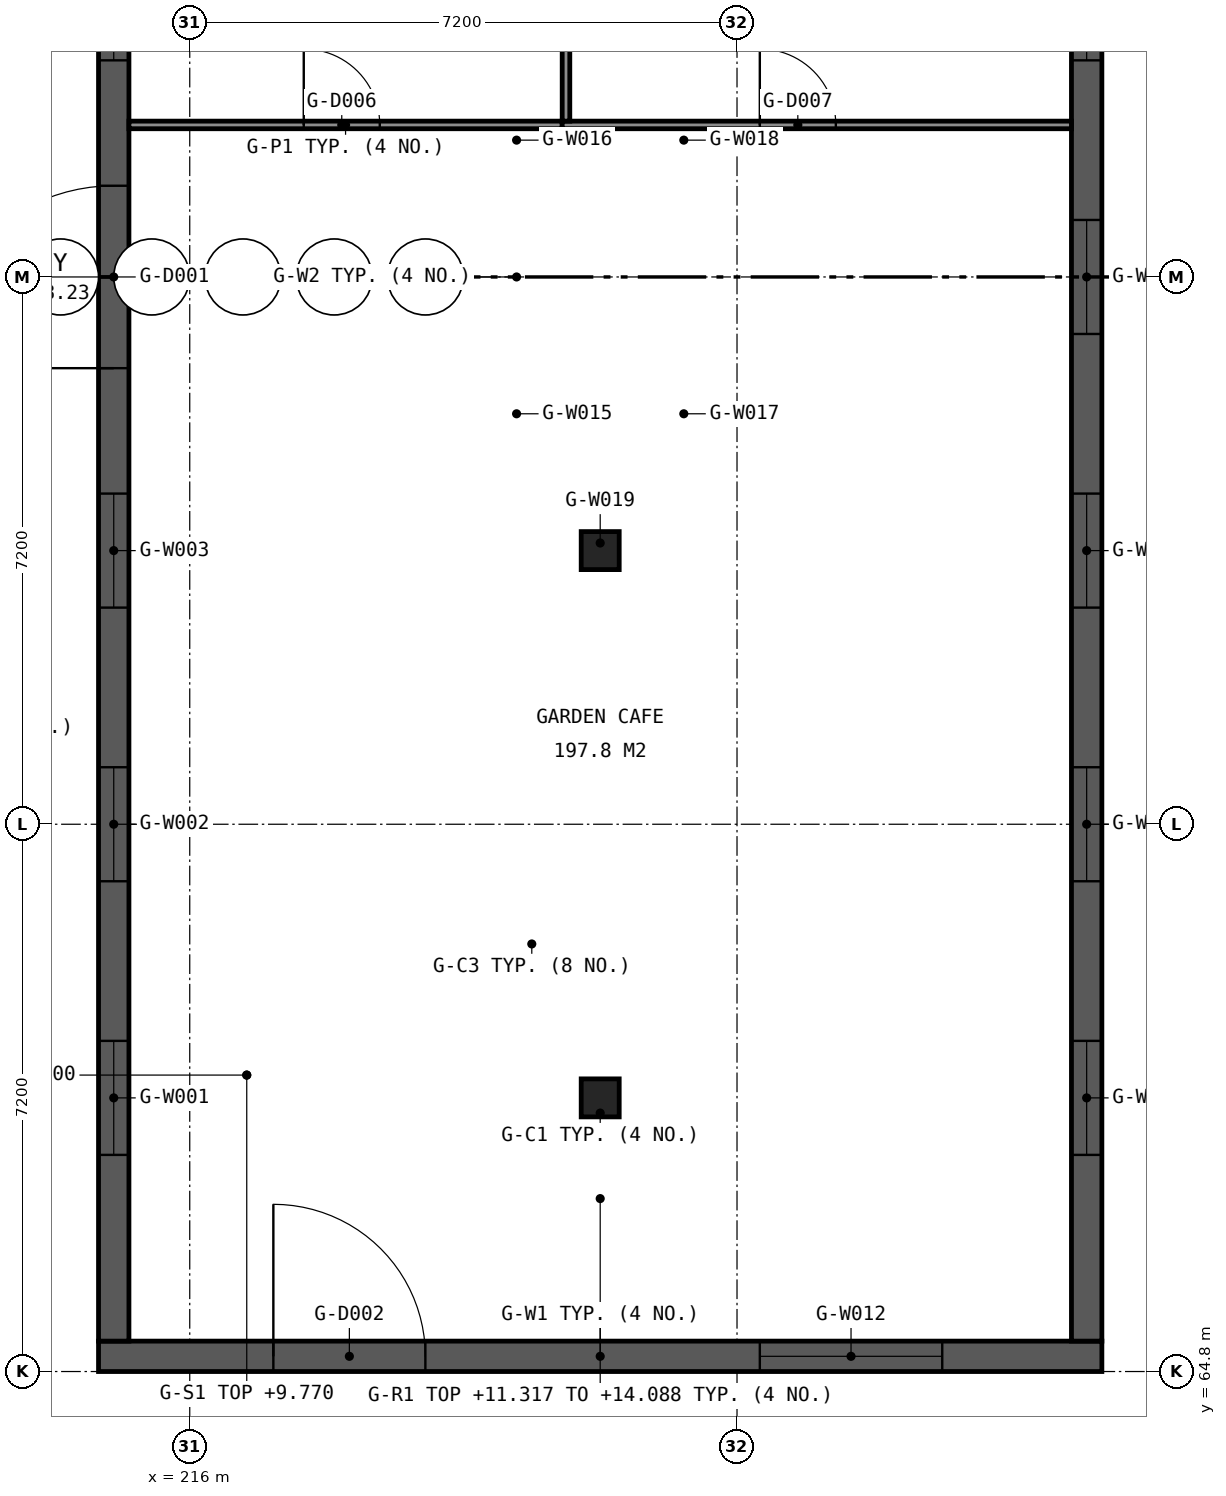
"""IFC4 building model, lengths in metres.
Left out: names, types, materials, properties, quantities, classifications, styles, units other than length and angle.
Written with IfcOpenShell. Run it as: python <this file> out.ifc"""

import sys

from ifc_helpers import new_model, si_unit, direction, frame, frame_2d, origin, origin_2d, place, context, subcontext, project, spatial, rectangle, extrude, element, fill, save


model = new_model("IFC4")
c1 = context("Model", 3, precision=1e-05, world=origin(), true_north=direction((0.0, 1.0)))
c2 = subcontext(c1, "Body", "Model", "MODEL_VIEW")
j1 = project(units=[si_unit("LENGTHUNIT", "METRE"), si_unit("PLANEANGLEUNIT", "RADIAN")], contexts=[c1])
p1 = place(None, origin())
s1 = spatial("IfcSite", under=j1, at=p1, CompositionType="ELEMENT")
p2 = place(p1, origin())
s2 = spatial("IfcBuilding", under=s1, at=p2, CompositionType="ELEMENT")
p3 = place(p2, frame((0.0, 0.0, 4.8)))
s3 = spatial("IfcBuildingStorey", under=s2, at=p3, CompositionType="ELEMENT", Elevation=4.8)
p4 = place(p3, frame((214.8, 65.0, -1.2), z_axis=(0.0, 0.0, 1.0), x_axis=(1.0, 0.0, 0.0)))
e1 = element("IfcWall", 1, at=p4, inside=s3, PredefinedType="SOLIDWALL", context=c2, shape_type="SweptSolid", body=[
    extrude(rectangle(XDim=13.2, YDim=0.4, at=frame_2d((6.6, 0.0))), origin(), (0.0, 0.0, 1.0), 7.2),
])
p5 = place(p4, frame((2.3, 0.0, 1.2)))
e2 = element("IfcOpeningElement", 2, at=p5, cuts=e1, PredefinedType="OPENING", context=c2, shape_type="SweptSolid", body=[
    extrude(rectangle(XDim=2.0, YDim=2.7, at=frame_2d((1.0, 1.35))), frame((0.0, 0.21, 0.0), z_axis=(0.0, -1.0, 0.0), x_axis=(1.0, 0.0, 0.0)), (0.0, 0.0, 1.0), 0.42),
])
p6 = place(p4, frame((8.7, 0.0, 2.1)))
e3 = element("IfcOpeningElement", 3, at=p6, cuts=e1, PredefinedType="OPENING", context=c2, shape_type="SweptSolid", body=[
    extrude(rectangle(XDim=2.4, YDim=3.3, at=frame_2d((1.2, 1.65))), frame((0.0, 0.21, 0.0), z_axis=(0.0, -1.0, 0.0), x_axis=(1.0, 0.0, 0.0)), (0.0, 0.0, 1.0), 0.42),
])
p7 = place(p3, frame((215.0, 65.2, -1.2), z_axis=(0.0, 0.0, 1.0), x_axis=(0.0, 1.0, 0.0)))
e4 = element("IfcWall", 4, at=p7, inside=s3, PredefinedType="SOLIDWALL", context=c2, shape_type="SweptSolid", body=[
    extrude(rectangle(XDim=28.0, YDim=0.4, at=frame_2d((14.0, 0.0))), origin(), (0.0, 0.0, 1.0), 7.2),
])
p8 = place(p7, frame((12.8, 0.0, 1.2)))
e5 = element("IfcOpeningElement", 5, at=p8, cuts=e4, PredefinedType="OPENING", context=c2, shape_type="SweptSolid", body=[
    extrude(rectangle(XDim=2.4, YDim=3.0, at=frame_2d((1.2, 1.5))), frame((0.0, 0.21, 0.0), z_axis=(0.0, -1.0, 0.0), x_axis=(1.0, 0.0, 0.0)), (0.0, 0.0, 1.0), 0.42),
])
p9 = place(p7, frame((24.325, 0.0, 1.2)))
e6 = element("IfcOpeningElement", 6, at=p9, cuts=e4, PredefinedType="OPENING", context=c2, shape_type="SweptSolid", body=[
    extrude(rectangle(XDim=0.95, YDim=2.1, at=frame_2d((0.475, 1.05))), frame((0.0, 0.21, 0.0), z_axis=(0.0, -1.0, 0.0), x_axis=(1.0, 0.0, 0.0)), (0.0, 0.0, 1.0), 0.42),
])
p10 = place(p7, frame((2.45, 0.0, 2.1)))
e7 = element("IfcOpeningElement", 7, at=p10, cuts=e4, PredefinedType="OPENING", context=c2, shape_type="SweptSolid", body=[
    extrude(rectangle(XDim=1.5, YDim=3.3, at=frame_2d((0.75, 1.65))), frame((0.0, 0.21, 0.0), z_axis=(0.0, -1.0, 0.0), x_axis=(1.0, 0.0, 0.0)), (0.0, 0.0, 1.0), 0.42),
])
p11 = place(p7, frame((6.05, 0.0, 2.1)))
e8 = element("IfcOpeningElement", 8, at=p11, cuts=e4, PredefinedType="OPENING", context=c2, shape_type="SweptSolid", body=[
    extrude(rectangle(XDim=1.5, YDim=3.3, at=frame_2d((0.75, 1.65))), frame((0.0, 0.21, 0.0), z_axis=(0.0, -1.0, 0.0), x_axis=(1.0, 0.0, 0.0)), (0.0, 0.0, 1.0), 0.42),
])
p12 = place(p7, frame((9.65, 0.0, 2.1)))
e9 = element("IfcOpeningElement", 9, at=p12, cuts=e4, PredefinedType="OPENING", context=c2, shape_type="SweptSolid", body=[
    extrude(rectangle(XDim=1.5, YDim=3.3, at=frame_2d((0.75, 1.65))), frame((0.0, 0.21, 0.0), z_axis=(0.0, -1.0, 0.0), x_axis=(1.0, 0.0, 0.0)), (0.0, 0.0, 1.0), 0.42),
])
p13 = place(p7, frame((16.85, 0.0, 2.1)))
e10 = element("IfcOpeningElement", 10, at=p13, cuts=e4, PredefinedType="OPENING", context=c2, shape_type="SweptSolid", body=[
    extrude(rectangle(XDim=1.5, YDim=3.3, at=frame_2d((0.75, 1.65))), frame((0.0, 0.21, 0.0), z_axis=(0.0, -1.0, 0.0), x_axis=(1.0, 0.0, 0.0)), (0.0, 0.0, 1.0), 0.42),
])
p14 = place(p7, frame((20.45, 0.0, 2.1)))
e11 = element("IfcOpeningElement", 11, at=p14, cuts=e4, PredefinedType="OPENING", context=c2, shape_type="SweptSolid", body=[
    extrude(rectangle(XDim=1.5, YDim=3.3, at=frame_2d((0.75, 1.65))), frame((0.0, 0.21, 0.0), z_axis=(0.0, -1.0, 0.0), x_axis=(1.0, 0.0, 0.0)), (0.0, 0.0, 1.0), 0.42),
])
p15 = place(p3, frame((227.8, 65.2, -1.2), z_axis=(0.0, 0.0, 1.0), x_axis=(0.0, 1.0, 0.0)))
e12 = element("IfcWall", 12, at=p15, inside=s3, PredefinedType="SOLIDWALL", context=c2, shape_type="SweptSolid", body=[
    extrude(rectangle(XDim=28.0, YDim=0.4, at=frame_2d((14.0, 0.0))), origin(), (0.0, 0.0, 1.0), 7.2),
])
p16 = place(p15, frame((20.6, 0.0, 1.2)))
e13 = element("IfcOpeningElement", 13, at=p16, cuts=e12, PredefinedType="OPENING", context=c2, shape_type="SweptSolid", body=[
    extrude(rectangle(XDim=1.2, YDim=2.1, at=frame_2d((0.6, 1.05))), frame((0.0, 0.21, 0.0), z_axis=(0.0, -1.0, 0.0), x_axis=(1.0, 0.0, 0.0)), (0.0, 0.0, 1.0), 0.42),
])
p17 = place(p15, frame((2.45, 0.0, 2.1)))
e14 = element("IfcOpeningElement", 14, at=p17, cuts=e12, PredefinedType="OPENING", context=c2, shape_type="SweptSolid", body=[
    extrude(rectangle(XDim=1.5, YDim=3.3, at=frame_2d((0.75, 1.65))), frame((0.0, 0.21, 0.0), z_axis=(0.0, -1.0, 0.0), x_axis=(1.0, 0.0, 0.0)), (0.0, 0.0, 1.0), 0.42),
])
p18 = place(p15, frame((6.05, 0.0, 2.1)))
e15 = element("IfcOpeningElement", 15, at=p18, cuts=e12, PredefinedType="OPENING", context=c2, shape_type="SweptSolid", body=[
    extrude(rectangle(XDim=1.5, YDim=3.3, at=frame_2d((0.75, 1.65))), frame((0.0, 0.21, 0.0), z_axis=(0.0, -1.0, 0.0), x_axis=(1.0, 0.0, 0.0)), (0.0, 0.0, 1.0), 0.42),
])
p19 = place(p15, frame((9.65, 0.0, 2.1)))
e16 = element("IfcOpeningElement", 16, at=p19, cuts=e12, PredefinedType="OPENING", context=c2, shape_type="SweptSolid", body=[
    extrude(rectangle(XDim=1.5, YDim=3.3, at=frame_2d((0.75, 1.65))), frame((0.0, 0.21, 0.0), z_axis=(0.0, -1.0, 0.0), x_axis=(1.0, 0.0, 0.0)), (0.0, 0.0, 1.0), 0.42),
])
p20 = place(p15, frame((13.25, 0.0, 2.1)))
e17 = element("IfcOpeningElement", 17, at=p20, cuts=e12, PredefinedType="OPENING", context=c2, shape_type="SweptSolid", body=[
    extrude(rectangle(XDim=1.5, YDim=3.3, at=frame_2d((0.75, 1.65))), frame((0.0, 0.21, 0.0), z_axis=(0.0, -1.0, 0.0), x_axis=(1.0, 0.0, 0.0)), (0.0, 0.0, 1.0), 0.42),
])
p21 = place(p15, frame((16.85, 0.0, 2.1)))
e18 = element("IfcOpeningElement", 18, at=p21, cuts=e12, PredefinedType="OPENING", context=c2, shape_type="SweptSolid", body=[
    extrude(rectangle(XDim=1.5, YDim=3.3, at=frame_2d((0.75, 1.65))), frame((0.0, 0.21, 0.0), z_axis=(0.0, -1.0, 0.0), x_axis=(1.0, 0.0, 0.0)), (0.0, 0.0, 1.0), 0.42),
])
p22 = place(p15, frame((24.2, 0.0, 2.7)))
e19 = element("IfcOpeningElement", 19, at=p22, cuts=e12, PredefinedType="OPENING", context=c2, shape_type="SweptSolid", body=[
    extrude(rectangle(XDim=1.2, YDim=1.2, at=frame_2d((0.6, 0.6))), frame((0.0, 0.21, 0.0), z_axis=(0.0, -1.0, 0.0), x_axis=(1.0, 0.0, 0.0)), (0.0, 0.0, 1.0), 0.42),
])
for number, where, z_axis, x_axis in (
    (20, (221.4, 68.4, -1.2), (0.0, 0.0, 1.0), (1.0, 0.0, 0.0)),
    (21, (221.4, 75.6, -1.2), (0.0, 0.0, 1.0), (1.0, 0.0, 0.0)),
):
    element("IfcColumn", number, at=place(p3, frame(where, z_axis=z_axis, x_axis=x_axis)), inside=s3, PredefinedType="COLUMN", context=c2, shape_type="SweptSolid", body=[
        extrude(rectangle(XDim=0.5, YDim=0.5, at=origin_2d()), origin(), (0.0, 0.0, 1.0), 4.95),
    ])
for number, where, z_axis, x_axis in (
    (22, (220.5, 70.5, 4.97), (0.0, 0.0, 1.0), (1.0, 0.0, 0.0)),
    (23, (220.5, 76.3, 4.97), (0.0, 0.0, 1.0), (1.0, 0.0, 0.0)),
    (24, (220.5, 82.1, 4.97), (0.0, 0.0, 1.0), (1.0, 0.0, 0.0)),
    (25, (222.3, 70.5, 4.97), (0.0, 0.0, 1.0), (1.0, 0.0, 0.0)),
    (26, (222.3, 76.3, 4.97), (0.0, 0.0, 1.0), (1.0, 0.0, 0.0)),
    (27, (222.3, 82.1, 4.97), (0.0, 0.0, 1.0), (1.0, 0.0, 0.0)),
):
    element("IfcColumn", number, at=place(p3, frame(where, z_axis=z_axis, x_axis=x_axis)), inside=s3, PredefinedType="COLUMN", context=c2, shape_type="SweptSolid", body=[
        extrude(rectangle(XDim=0.3, YDim=0.3, at=origin_2d()), origin(), (0.0, 0.0, 1.0), 3.931),
    ])
p23 = place(p3, frame((220.3, 75.6, 9.321), z_axis=(0.0, 0.0, 1.0), x_axis=(0.0, 1.0, 0.0)))
e28 = element("IfcWall", 28, at=p23, inside=s3, PredefinedType="SOLIDWALL", context=c2, shape_type="SweptSolid", body=[
    extrude(rectangle(XDim=7.2, YDim=0.2, at=frame_2d((3.6, 0.0))), origin(), (0.0, 0.0, 1.0), 2.2),
])
p24 = place(p23, frame((0.3, 0.0, 0.35)))
e29 = element("IfcOpeningElement", 29, at=p24, cuts=e28, PredefinedType="OPENING", context=c2, shape_type="SweptSolid", body=[
    extrude(rectangle(XDim=3.0, YDim=1.6, at=frame_2d((1.5, 0.8))), frame((0.0, 0.11, 0.0), z_axis=(0.0, -1.0, 0.0), x_axis=(1.0, 0.0, 0.0)), (0.0, 0.0, 1.0), 0.22),
])
p25 = place(p23, frame((3.9, 0.0, 0.35)))
e30 = element("IfcOpeningElement", 30, at=p25, cuts=e28, PredefinedType="OPENING", context=c2, shape_type="SweptSolid", body=[
    extrude(rectangle(XDim=3.0, YDim=1.6, at=frame_2d((1.5, 0.8))), frame((0.0, 0.11, 0.0), z_axis=(0.0, -1.0, 0.0), x_axis=(1.0, 0.0, 0.0)), (0.0, 0.0, 1.0), 0.22),
])
p26 = place(p3, frame((222.5, 75.6, 9.321), z_axis=(0.0, 0.0, 1.0), x_axis=(0.0, 1.0, 0.0)))
e31 = element("IfcWall", 31, at=p26, inside=s3, PredefinedType="SOLIDWALL", context=c2, shape_type="SweptSolid", body=[
    extrude(rectangle(XDim=7.2, YDim=0.2, at=frame_2d((3.6, 0.0))), origin(), (0.0, 0.0, 1.0), 2.2),
])
p27 = place(p26, frame((0.3, 0.0, 0.35)))
e32 = element("IfcOpeningElement", 32, at=p27, cuts=e31, PredefinedType="OPENING", context=c2, shape_type="SweptSolid", body=[
    extrude(rectangle(XDim=3.0, YDim=1.6, at=frame_2d((1.5, 0.8))), frame((0.0, 0.11, 0.0), z_axis=(0.0, -1.0, 0.0), x_axis=(1.0, 0.0, 0.0)), (0.0, 0.0, 1.0), 0.22),
])
p28 = place(p26, frame((3.9, 0.0, 0.35)))
e33 = element("IfcOpeningElement", 33, at=p28, cuts=e31, PredefinedType="OPENING", context=c2, shape_type="SweptSolid", body=[
    extrude(rectangle(XDim=3.0, YDim=1.6, at=frame_2d((1.5, 0.8))), frame((0.0, 0.11, 0.0), z_axis=(0.0, -1.0, 0.0), x_axis=(1.0, 0.0, 0.0)), (0.0, 0.0, 1.0), 0.22),
])
p29 = place(p3, frame((220.4, 75.7, 9.321), z_axis=(0.0, 0.0, 1.0), x_axis=(1.0, 0.0, 0.0)))
e34 = element("IfcWall", 34, at=p29, inside=s3, PredefinedType="SOLIDWALL", context=c2, shape_type="SweptSolid", body=[
    extrude(rectangle(XDim=2.0, YDim=0.2, at=frame_2d((1.0, 0.0))), origin(), (0.0, 0.0, 1.0), 2.2),
])
p30 = place(p29, frame((0.4, 0.0, 0.35)))
e35 = element("IfcOpeningElement", 35, at=p30, cuts=e34, PredefinedType="OPENING", context=c2, shape_type="SweptSolid", body=[
    extrude(rectangle(XDim=1.2, YDim=1.6, at=frame_2d((0.6, 0.8))), frame((0.0, 0.11, 0.0), z_axis=(0.0, -1.0, 0.0), x_axis=(1.0, 0.0, 0.0)), (0.0, 0.0, 1.0), 0.22),
])
p31 = place(p3, frame((215.2, 81.2, 0.0), z_axis=(0.0, 0.0, 1.0), x_axis=(1.0, 0.0, 0.0)))
e36 = element("IfcWall", 36, at=p31, inside=s3, PredefinedType="PARTITIONING", context=c2, shape_type="SweptSolid", body=[
    extrude(rectangle(XDim=5.7, YDim=0.1, at=frame_2d((2.85, 0.0))), origin(), (0.0, 0.0, 1.0), 3.75),
])
p32 = place(p31, frame((2.3, 0.0, 0.0)))
e37 = element("IfcOpeningElement", 37, at=p32, cuts=e36, PredefinedType="OPENING", context=c2, shape_type="SweptSolid", body=[
    extrude(rectangle(XDim=1.0, YDim=2.1, at=frame_2d((0.5, 1.05))), frame((0.0, 0.06, 0.0), z_axis=(0.0, -1.0, 0.0), x_axis=(1.0, 0.0, 0.0)), (0.0, 0.0, 1.0), 0.12),
])
p33 = place(p3, frame((220.9, 81.2, 0.0), z_axis=(0.0, 0.0, 1.0), x_axis=(1.0, 0.0, 0.0)))
e38 = element("IfcWall", 38, at=p33, inside=s3, PredefinedType="PARTITIONING", context=c2, shape_type="SweptSolid", body=[
    extrude(rectangle(XDim=6.7, YDim=0.1, at=frame_2d((3.35, 0.0))), origin(), (0.0, 0.0, 1.0), 3.75),
])
p34 = place(p33, frame((2.6, 0.0, 0.0)))
e39 = element("IfcOpeningElement", 39, at=p34, cuts=e38, PredefinedType="OPENING", context=c2, shape_type="SweptSolid", body=[
    extrude(rectangle(XDim=1.0, YDim=2.1, at=frame_2d((0.5, 1.05))), frame((0.0, 0.06, 0.0), z_axis=(0.0, -1.0, 0.0), x_axis=(1.0, 0.0, 0.0)), (0.0, 0.0, 1.0), 0.12),
])
p35 = place(p3, frame((220.95, 81.25, 0.0), z_axis=(0.0, 0.0, 1.0), x_axis=(0.0, 1.0, 0.0)))
e40 = element("IfcWall", 40, at=p35, inside=s3, PredefinedType="PARTITIONING", context=c2, shape_type="SweptSolid", body=[
    extrude(rectangle(XDim=6.65, YDim=0.1, at=frame_2d((3.325, 0.0))), origin(), (0.0, 0.0, 1.0), 3.75),
])
p36 = place(p8, origin())
e41 = element("IfcDoor", 41, at=p36, inside=s3, OperationType="DOUBLE_DOOR_SINGLE_SWING", PredefinedType="DOOR", context=c2, shape_type="SweptSolid", body=[
    extrude(rectangle(XDim=2.4, YDim=3.0, at=frame_2d((1.2, 1.5))), frame((0.0, -0.15, 0.0), z_axis=(0.0, -1.0, 0.0), x_axis=(1.0, 0.0, 0.0)), (0.0, 0.0, 1.0), 0.05),
])
fill(e5, e41)
p37 = place(p5, origin())
e42 = element("IfcDoor", 42, at=p37, inside=s3, OperationType="DOUBLE_DOOR_SINGLE_SWING", PredefinedType="DOOR", context=c2, shape_type="SweptSolid", body=[
    extrude(rectangle(XDim=2.0, YDim=2.7, at=frame_2d((1.0, 1.35))), frame((0.0, 0.2, 0.0), z_axis=(0.0, -1.0, 0.0), x_axis=(1.0, 0.0, 0.0)), (0.0, 0.0, 1.0), 0.05),
])
fill(e2, e42)
p38 = place(p10, origin())
e43 = element("IfcWindow", 43, at=p38, inside=s3, PartitioningType="SINGLE_PANEL", PredefinedType="WINDOW", context=c2, shape_type="SweptSolid", body=[
    extrude(rectangle(XDim=1.5, YDim=3.3, at=frame_2d((0.75, 1.65))), frame((0.0, -0.14, 0.0), z_axis=(0.0, -1.0, 0.0), x_axis=(1.0, 0.0, 0.0)), (0.0, 0.0, 1.0), 0.06),
])
fill(e7, e43)
p39 = place(p11, origin())
e44 = element("IfcWindow", 44, at=p39, inside=s3, PartitioningType="SINGLE_PANEL", PredefinedType="WINDOW", context=c2, shape_type="SweptSolid", body=[
    extrude(rectangle(XDim=1.5, YDim=3.3, at=frame_2d((0.75, 1.65))), frame((0.0, -0.14, 0.0), z_axis=(0.0, -1.0, 0.0), x_axis=(1.0, 0.0, 0.0)), (0.0, 0.0, 1.0), 0.06),
])
fill(e8, e44)
p40 = place(p12, origin())
e45 = element("IfcWindow", 45, at=p40, inside=s3, PartitioningType="SINGLE_PANEL", PredefinedType="WINDOW", context=c2, shape_type="SweptSolid", body=[
    extrude(rectangle(XDim=1.5, YDim=3.3, at=frame_2d((0.75, 1.65))), frame((0.0, -0.14, 0.0), z_axis=(0.0, -1.0, 0.0), x_axis=(1.0, 0.0, 0.0)), (0.0, 0.0, 1.0), 0.06),
])
fill(e9, e45)
p41 = place(p13, origin())
e46 = element("IfcWindow", 46, at=p41, inside=s3, PartitioningType="SINGLE_PANEL", PredefinedType="WINDOW", context=c2, shape_type="SweptSolid", body=[
    extrude(rectangle(XDim=1.5, YDim=3.3, at=frame_2d((0.75, 1.65))), frame((0.0, -0.14, 0.0), z_axis=(0.0, -1.0, 0.0), x_axis=(1.0, 0.0, 0.0)), (0.0, 0.0, 1.0), 0.06),
])
fill(e10, e46)
p42 = place(p17, origin())
e47 = element("IfcWindow", 47, at=p42, inside=s3, PartitioningType="SINGLE_PANEL", PredefinedType="WINDOW", context=c2, shape_type="SweptSolid", body=[
    extrude(rectangle(XDim=1.5, YDim=3.3, at=frame_2d((0.75, 1.65))), frame((0.0, 0.2, 0.0), z_axis=(0.0, -1.0, 0.0), x_axis=(1.0, 0.0, 0.0)), (0.0, 0.0, 1.0), 0.06),
])
fill(e14, e47)
p43 = place(p18, origin())
e48 = element("IfcWindow", 48, at=p43, inside=s3, PartitioningType="SINGLE_PANEL", PredefinedType="WINDOW", context=c2, shape_type="SweptSolid", body=[
    extrude(rectangle(XDim=1.5, YDim=3.3, at=frame_2d((0.75, 1.65))), frame((0.0, 0.2, 0.0), z_axis=(0.0, -1.0, 0.0), x_axis=(1.0, 0.0, 0.0)), (0.0, 0.0, 1.0), 0.06),
])
fill(e15, e48)
p44 = place(p19, origin())
e49 = element("IfcWindow", 49, at=p44, inside=s3, PartitioningType="SINGLE_PANEL", PredefinedType="WINDOW", context=c2, shape_type="SweptSolid", body=[
    extrude(rectangle(XDim=1.5, YDim=3.3, at=frame_2d((0.75, 1.65))), frame((0.0, 0.2, 0.0), z_axis=(0.0, -1.0, 0.0), x_axis=(1.0, 0.0, 0.0)), (0.0, 0.0, 1.0), 0.06),
])
fill(e16, e49)
p45 = place(p20, origin())
e50 = element("IfcWindow", 50, at=p45, inside=s3, PartitioningType="SINGLE_PANEL", PredefinedType="WINDOW", context=c2, shape_type="SweptSolid", body=[
    extrude(rectangle(XDim=1.5, YDim=3.3, at=frame_2d((0.75, 1.65))), frame((0.0, 0.2, 0.0), z_axis=(0.0, -1.0, 0.0), x_axis=(1.0, 0.0, 0.0)), (0.0, 0.0, 1.0), 0.06),
])
fill(e17, e50)
p46 = place(p21, origin())
e51 = element("IfcWindow", 51, at=p46, inside=s3, PartitioningType="SINGLE_PANEL", PredefinedType="WINDOW", context=c2, shape_type="SweptSolid", body=[
    extrude(rectangle(XDim=1.5, YDim=3.3, at=frame_2d((0.75, 1.65))), frame((0.0, 0.2, 0.0), z_axis=(0.0, -1.0, 0.0), x_axis=(1.0, 0.0, 0.0)), (0.0, 0.0, 1.0), 0.06),
])
fill(e18, e51)
p47 = place(p6, origin())
e52 = element("IfcWindow", 52, at=p47, inside=s3, PartitioningType="SINGLE_PANEL", PredefinedType="WINDOW", context=c2, shape_type="SweptSolid", body=[
    extrude(rectangle(XDim=2.4, YDim=3.3, at=frame_2d((1.2, 1.65))), frame((0.0, 0.2, 0.0), z_axis=(0.0, -1.0, 0.0), x_axis=(1.0, 0.0, 0.0)), (0.0, 0.0, 1.0), 0.06),
])
fill(e3, e52)
p48 = place(p24, origin())
e53 = element("IfcWindow", 53, at=p48, inside=s3, PartitioningType="SINGLE_PANEL", PredefinedType="WINDOW", context=c2, shape_type="SweptSolid", body=[
    extrude(rectangle(XDim=3.0, YDim=1.6, at=frame_2d((1.5, 0.8))), frame((0.0, 0.03, 0.0), z_axis=(0.0, -1.0, 0.0), x_axis=(1.0, 0.0, 0.0)), (0.0, 0.0, 1.0), 0.06),
])
fill(e29, e53)
p49 = place(p25, origin())
e54 = element("IfcWindow", 54, at=p49, inside=s3, PartitioningType="SINGLE_PANEL", PredefinedType="WINDOW", context=c2, shape_type="SweptSolid", body=[
    extrude(rectangle(XDim=3.0, YDim=1.6, at=frame_2d((1.5, 0.8))), frame((0.0, 0.03, 0.0), z_axis=(0.0, -1.0, 0.0), x_axis=(1.0, 0.0, 0.0)), (0.0, 0.0, 1.0), 0.06),
])
fill(e30, e54)
p50 = place(p27, origin())
e55 = element("IfcWindow", 55, at=p50, inside=s3, PartitioningType="SINGLE_PANEL", PredefinedType="WINDOW", context=c2, shape_type="SweptSolid", body=[
    extrude(rectangle(XDim=3.0, YDim=1.6, at=frame_2d((1.5, 0.8))), frame((0.0, 0.03, 0.0), z_axis=(0.0, -1.0, 0.0), x_axis=(1.0, 0.0, 0.0)), (0.0, 0.0, 1.0), 0.06),
])
fill(e32, e55)
p51 = place(p28, origin())
e56 = element("IfcWindow", 56, at=p51, inside=s3, PartitioningType="SINGLE_PANEL", PredefinedType="WINDOW", context=c2, shape_type="SweptSolid", body=[
    extrude(rectangle(XDim=3.0, YDim=1.6, at=frame_2d((1.5, 0.8))), frame((0.0, 0.03, 0.0), z_axis=(0.0, -1.0, 0.0), x_axis=(1.0, 0.0, 0.0)), (0.0, 0.0, 1.0), 0.06),
])
fill(e33, e56)
p52 = place(p30, origin())
e57 = element("IfcWindow", 57, at=p52, inside=s3, PartitioningType="SINGLE_PANEL", PredefinedType="WINDOW", context=c2, shape_type="SweptSolid", body=[
    extrude(rectangle(XDim=1.2, YDim=1.6, at=frame_2d((0.6, 0.8))), frame((0.0, 0.03, 0.0), z_axis=(0.0, -1.0, 0.0), x_axis=(1.0, 0.0, 0.0)), (0.0, 0.0, 1.0), 0.06),
])
fill(e35, e57)
p53 = place(p32, origin())
e58 = element("IfcDoor", 58, at=p53, inside=s3, OperationType="SINGLE_SWING_LEFT", PredefinedType="DOOR", context=c2, shape_type="SweptSolid", body=[
    extrude(rectangle(XDim=1.0, YDim=2.1, at=frame_2d((0.5, 1.05))), frame((0.0, 0.025, 0.0), z_axis=(0.0, -1.0, 0.0), x_axis=(1.0, 0.0, 0.0)), (0.0, 0.0, 1.0), 0.05),
])
fill(e37, e58)
p54 = place(p34, origin())
e59 = element("IfcDoor", 59, at=p54, inside=s3, OperationType="SINGLE_SWING_LEFT", PredefinedType="DOOR", context=c2, shape_type="SweptSolid", body=[
    extrude(rectangle(XDim=1.0, YDim=2.1, at=frame_2d((0.5, 1.05))), frame((0.0, 0.025, 0.0), z_axis=(0.0, -1.0, 0.0), x_axis=(1.0, 0.0, 0.0)), (0.0, 0.0, 1.0), 0.05),
])
fill(e39, e59)
save(model, sys.argv[1])
